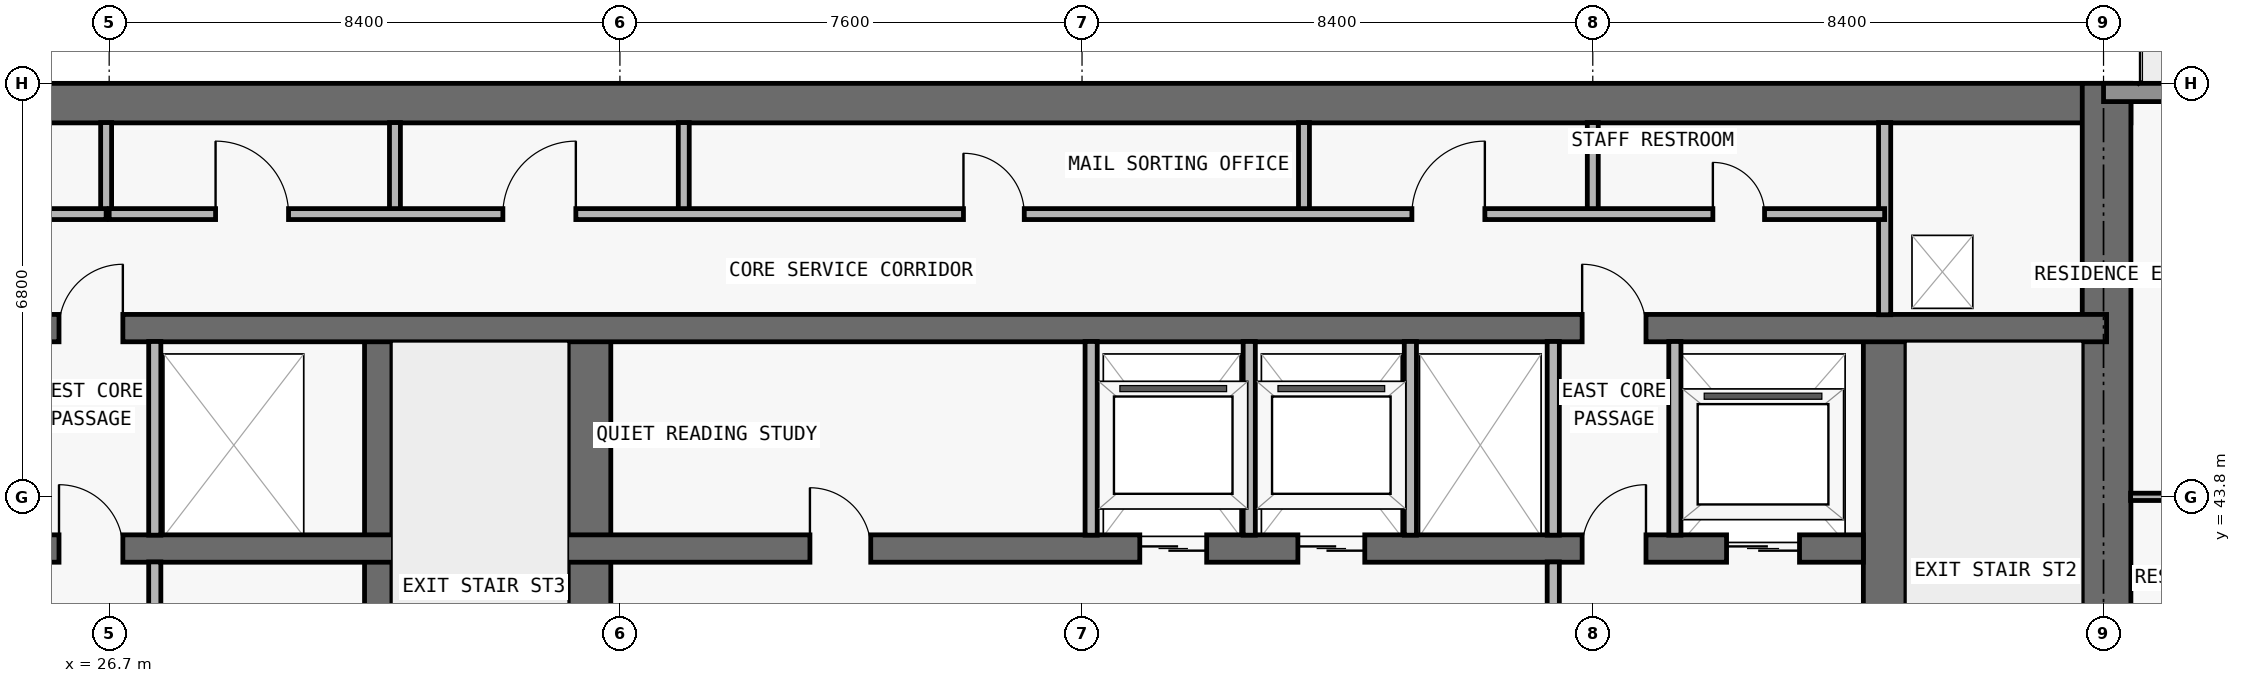
"""IFC4 building model, lengths in metres.
Left out: names, types, materials, properties, quantities, classifications, styles, units other than length and angle.
Written with IfcOpenShell. Run it as: python <this file> out.ifc"""

import sys

from ifc_helpers import new_model, si_unit, direction, frame, frame_2d, origin, place, context, subcontext, project, spatial, rectangle, extrude, element, fill, save


model = new_model("IFC4")
c1 = context("Model", 3, precision=1e-05, world=origin(), true_north=direction((0.0, 1.0)))
c2 = subcontext(c1, "Body", "Model", "MODEL_VIEW")
j1 = project(units=[si_unit("LENGTHUNIT", "METRE"), si_unit("PLANEANGLEUNIT", "RADIAN")], contexts=[c1])
p1 = place(None, origin())
s1 = spatial("IfcSite", under=j1, at=p1, CompositionType="ELEMENT")
p2 = place(p1, origin())
s2 = spatial("IfcBuilding", under=s1, at=p2, CompositionType="ELEMENT")
p3 = place(p2, frame((0.0, 0.0, 125.7)))
s3 = spatial("IfcBuildingStorey", under=s2, at=p3, CompositionType="ELEMENT", Elevation=125.7)
p4 = place(p3, frame((17.85, 50.275, 0.0), z_axis=(0.0, 0.0, 1.0), x_axis=(1.0, 0.0, 0.0)))
e1 = element("IfcWall", 1, at=p4, inside=s3, PredefinedType="SHEAR", context=c2, shape_type="SweptSolid", body=[
    extrude(rectangle(XDim=42.1, YDim=0.65, at=frame_2d((21.05, 0.0))), origin(), (0.0, 0.0, 1.0), 3.05),
])
p5 = place(p3, frame((59.55, 36.55, 0.0), z_axis=(0.0, 0.0, 1.0), x_axis=(0.0, 1.0, 0.0)))
e2 = element("IfcWall", 2, at=p5, inside=s3, PredefinedType="SHEAR", context=c2, shape_type="SweptSolid", body=[
    extrude(rectangle(XDim=14.05, YDim=0.8, at=frame_2d((7.025, 0.0))), origin(), (0.0, 0.0, 1.0), 3.05),
])
p6 = place(p3, frame((55.9, 36.95, 0.0), z_axis=(0.0, 0.0, 1.0), x_axis=(0.0, 1.0, 0.0)))
e3 = element("IfcWall", 3, at=p6, inside=s3, PredefinedType="SHEAR", context=c2, shape_type="SweptSolid", body=[
    extrude(rectangle(XDim=9.625, YDim=0.7, at=frame_2d((4.812, 0.0))), origin(), (0.0, 0.0, 1.0), 3.05),
])
p7 = place(p6, frame((0.6, 0.0, 0.0)))
e4 = element("IfcOpeningElement", 4, at=p7, cuts=e3, PredefinedType="OPENING", context=c2, shape_type="SweptSolid", body=[
    extrude(rectangle(XDim=1.1, YDim=2.15, at=frame_2d((0.55, 1.075))), frame((0.0, 0.36, 0.0), z_axis=(0.0, -1.0, 0.0), x_axis=(1.0, 0.0, 0.0)), (0.0, 0.0, 1.0), 0.72),
])
p8 = place(p3, frame((31.125, 36.95, 0.0), z_axis=(0.0, 0.0, 1.0), x_axis=(0.0, 1.0, 0.0)))
e5 = element("IfcWall", 5, at=p8, inside=s3, PredefinedType="SHEAR", context=c2, shape_type="SweptSolid", body=[
    extrude(rectangle(XDim=9.625, YDim=0.45, at=frame_2d((4.812, 0.0))), origin(), (0.0, 0.0, 1.0), 3.05),
])
p9 = place(p3, frame((34.6, 36.95, 0.0), z_axis=(0.0, 0.0, 1.0), x_axis=(0.0, 1.0, 0.0)))
e6 = element("IfcWall", 6, at=p9, inside=s3, PredefinedType="SHEAR", context=c2, shape_type="SweptSolid", body=[
    extrude(rectangle(XDim=9.625, YDim=0.7, at=frame_2d((4.812, 0.0))), origin(), (0.0, 0.0, 1.0), 3.05),
])
p10 = place(p3, frame((22.25, 42.95, 0.0), z_axis=(0.0, 0.0, 1.0), x_axis=(1.0, 0.0, 0.0)))
e7 = element("IfcWall", 7, at=p10, inside=s3, PredefinedType="SHEAR", context=c2, shape_type="SweptSolid", body=[
    extrude(rectangle(XDim=33.3, YDim=0.45, at=frame_2d((16.65, 0.0))), origin(), (0.0, 0.0, 1.0), 3.05),
])
p11 = place(p10, frame((1.05, 0.0, 0.0)))
e8 = element("IfcOpeningElement", 8, at=p11, cuts=e7, PredefinedType="OPENING", context=c2, shape_type="SweptSolid", body=[
    extrude(rectangle(XDim=1.2, YDim=2.2, at=frame_2d((0.6, 1.1))), frame((0.0, 0.235, 0.0), z_axis=(0.0, -1.0, 0.0), x_axis=(1.0, 0.0, 0.0)), (0.0, 0.0, 1.0), 0.47),
])
p12 = place(p10, frame((31.05, 0.0, 0.0)))
e9 = element("IfcOpeningElement", 9, at=p12, cuts=e7, PredefinedType="OPENING", context=c2, shape_type="SweptSolid", body=[
    extrude(rectangle(XDim=1.2, YDim=2.2, at=frame_2d((0.6, 1.1))), frame((0.0, 0.235, 0.0), z_axis=(0.0, -1.0, 0.0), x_axis=(1.0, 0.0, 0.0)), (0.0, 0.0, 1.0), 0.47),
])
p13 = place(p10, frame((21.4, 0.0, 0.0)))
e10 = element("IfcOpeningElement", 10, at=p13, cuts=e7, PredefinedType="OPENING", context=c2, shape_type="SweptSolid", body=[
    extrude(rectangle(XDim=1.1, YDim=2.2, at=frame_2d((0.55, 1.1))), frame((0.0, 0.235, 0.0), z_axis=(0.0, -1.0, 0.0), x_axis=(1.0, 0.0, 0.0)), (0.0, 0.0, 1.0), 0.47),
])
p14 = place(p10, frame((24.0, 0.0, 0.0)))
e11 = element("IfcOpeningElement", 11, at=p14, cuts=e7, PredefinedType="OPENING", context=c2, shape_type="SweptSolid", body=[
    extrude(rectangle(XDim=1.1, YDim=2.2, at=frame_2d((0.55, 1.1))), frame((0.0, 0.235, 0.0), z_axis=(0.0, -1.0, 0.0), x_axis=(1.0, 0.0, 0.0)), (0.0, 0.0, 1.0), 0.47),
])
p15 = place(p10, frame((3.625, 0.0, 0.0)))
e12 = element("IfcOpeningElement", 12, at=p15, cuts=e7, PredefinedType="OPENING", context=c2, shape_type="SweptSolid", body=[
    extrude(rectangle(XDim=1.05, YDim=2.15, at=frame_2d((0.525, 1.075))), frame((0.0, 0.235, 0.0), z_axis=(0.0, -1.0, 0.0), x_axis=(1.0, 0.0, 0.0)), (0.0, 0.0, 1.0), 0.47),
])
p16 = place(p10, frame((28.675, 0.0, 0.0)))
e13 = element("IfcOpeningElement", 13, at=p16, cuts=e7, PredefinedType="OPENING", context=c2, shape_type="SweptSolid", body=[
    extrude(rectangle(XDim=1.05, YDim=2.15, at=frame_2d((0.525, 1.075))), frame((0.0, 0.235, 0.0), z_axis=(0.0, -1.0, 0.0), x_axis=(1.0, 0.0, 0.0)), (0.0, 0.0, 1.0), 0.47),
])
p17 = place(p10, frame((15.975, 0.0, 0.0)))
e14 = element("IfcOpeningElement", 14, at=p17, cuts=e7, PredefinedType="OPENING", context=c2, shape_type="SweptSolid", body=[
    extrude(rectangle(XDim=1.0, YDim=2.2, at=frame_2d((0.5, 1.1))), frame((0.0, 0.235, 0.0), z_axis=(0.0, -1.0, 0.0), x_axis=(1.0, 0.0, 0.0)), (0.0, 0.0, 1.0), 0.47),
])
p18 = place(p3, frame((18.25, 46.575, 0.0), z_axis=(0.0, 0.0, 1.0), x_axis=(1.0, 0.0, 0.0)))
e15 = element("IfcWall", 15, at=p18, inside=s3, PredefinedType="SHEAR", context=c2, shape_type="SweptSolid", body=[
    extrude(rectangle(XDim=41.3, YDim=0.45, at=frame_2d((20.65, 0.0))), origin(), (0.0, 0.0, 1.0), 3.05),
])
p19 = place(p18, frame((7.625, 0.0, 0.0)))
e16 = element("IfcOpeningElement", 16, at=p19, cuts=e15, PredefinedType="OPENING", context=c2, shape_type="SweptSolid", body=[
    extrude(rectangle(XDim=1.05, YDim=2.15, at=frame_2d((0.525, 1.075))), frame((0.0, 0.235, 0.0), z_axis=(0.0, -1.0, 0.0), x_axis=(1.0, 0.0, 0.0)), (0.0, 0.0, 1.0), 0.47),
])
p20 = place(p18, frame((32.675, 0.0, 0.0)))
e17 = element("IfcOpeningElement", 17, at=p20, cuts=e15, PredefinedType="OPENING", context=c2, shape_type="SweptSolid", body=[
    extrude(rectangle(XDim=1.05, YDim=2.15, at=frame_2d((0.525, 1.075))), frame((0.0, 0.235, 0.0), z_axis=(0.0, -1.0, 0.0), x_axis=(1.0, 0.0, 0.0)), (0.0, 0.0, 1.0), 0.47),
])
p21 = place(p3, frame((59.5, 50.45, 0.0), z_axis=(0.0, 0.0, 1.0), x_axis=(1.0, 0.0, 0.0)))
e18 = element("IfcWall", 18, at=p21, inside=s3, PredefinedType="STANDARD", context=c2, shape_type="SweptSolid", body=[
    extrude(rectangle(XDim=10.6, YDim=0.3, at=frame_2d((5.3, 0.0))), origin(), (0.0, 0.0, 1.0), 3.05),
])
p22 = place(p21, frame((4.3, 0.0, 0.0)))
e19 = element("IfcOpeningElement", 19, at=p22, cuts=e18, PredefinedType="OPENING", context=c2, shape_type="SweptSolid", body=[
    extrude(rectangle(XDim=2.0, YDim=2.3, at=frame_2d((1.0, 1.15))), frame((0.0, 0.16, 0.0), z_axis=(0.0, -1.0, 0.0), x_axis=(1.0, 0.0, 0.0)), (0.0, 0.0, 1.0), 0.32),
])
p23 = place(p3, frame((26.65, 48.45, 0.0), z_axis=(0.0, 0.0, 1.0), x_axis=(0.0, 1.0, 0.0)))
e20 = element("IfcWall", 20, at=p23, inside=s3, PredefinedType="PARTITIONING", context=c2, shape_type="SweptSolid", body=[
    extrude(rectangle(XDim=1.505, YDim=0.18, at=frame_2d((0.752, 0.0))), origin(), (0.0, 0.0, 1.0), 3.05),
])
p24 = place(p3, frame((27.45, 37.345, 0.0), z_axis=(0.0, 0.0, 1.0), x_axis=(0.0, 1.0, 0.0)))
e21 = element("IfcWall", 21, at=p24, inside=s3, PredefinedType="PARTITIONING", context=c2, shape_type="SweptSolid", body=[
    extrude(rectangle(XDim=5.385, YDim=0.2, at=frame_2d((2.692, 0.0))), origin(), (0.0, 0.0, 1.0), 3.05),
])
p25 = place(p3, frame((27.45, 43.17, 0.0), z_axis=(0.0, 0.0, 1.0), x_axis=(0.0, 1.0, 0.0)))
e22 = element("IfcWall", 22, at=p25, inside=s3, PredefinedType="PARTITIONING", context=c2, shape_type="SweptSolid", body=[
    extrude(rectangle(XDim=3.185, YDim=0.2, at=frame_2d((1.593, 0.0))), origin(), (0.0, 0.0, 1.0), 3.05),
])
for number, where, z_axis, x_axis in (
    (23, (31.4, 48.45, 0.0), (0.0, 0.0, 1.0), (0.0, 1.0, 0.0)),
    (24, (36.15, 48.45, 0.0), (0.0, 0.0, 1.0), (0.0, 1.0, 0.0)),
):
    element("IfcWall", number, at=place(p3, frame(where, z_axis=z_axis, x_axis=x_axis)), inside=s3, PredefinedType="PARTITIONING", context=c2, shape_type="SweptSolid", body=[
        extrude(rectangle(XDim=1.505, YDim=0.18, at=frame_2d((0.752, 0.0))), origin(), (0.0, 0.0, 1.0), 3.05),
    ])
for number, where, z_axis, x_axis in (
    (25, (42.85, 43.17, 0.0), (0.0, 0.0, 1.0), (0.0, 1.0, 0.0)),
    (26, (45.45, 43.17, 0.0), (0.0, 0.0, 1.0), (0.0, 1.0, 0.0)),
):
    element("IfcWall", number, at=place(p3, frame(where, z_axis=z_axis, x_axis=x_axis)), inside=s3, PredefinedType="PARTITIONING", context=c2, shape_type="SweptSolid", body=[
        extrude(rectangle(XDim=3.185, YDim=0.2, at=frame_2d((1.593, 0.0))), origin(), (0.0, 0.0, 1.0), 3.05),
    ])
p26 = place(p3, frame((46.35, 48.45, 0.0), z_axis=(0.0, 0.0, 1.0), x_axis=(0.0, 1.0, 0.0)))
e27 = element("IfcWall", 27, at=p26, inside=s3, PredefinedType="PARTITIONING", context=c2, shape_type="SweptSolid", body=[
    extrude(rectangle(XDim=1.505, YDim=0.18, at=frame_2d((0.752, 0.0))), origin(), (0.0, 0.0, 1.0), 3.05),
])
p27 = place(p3, frame((48.1, 43.17, 0.0), z_axis=(0.0, 0.0, 1.0), x_axis=(0.0, 1.0, 0.0)))
e28 = element("IfcWall", 28, at=p27, inside=s3, PredefinedType="PARTITIONING", context=c2, shape_type="SweptSolid", body=[
    extrude(rectangle(XDim=3.185, YDim=0.2, at=frame_2d((1.593, 0.0))), origin(), (0.0, 0.0, 1.0), 3.05),
])
p28 = place(p3, frame((50.45, 37.345, 0.0), z_axis=(0.0, 0.0, 1.0), x_axis=(0.0, 1.0, 0.0)))
e29 = element("IfcWall", 29, at=p28, inside=s3, PredefinedType="PARTITIONING", context=c2, shape_type="SweptSolid", body=[
    extrude(rectangle(XDim=5.385, YDim=0.2, at=frame_2d((2.692, 0.0))), origin(), (0.0, 0.0, 1.0), 3.05),
])
p29 = place(p3, frame((50.45, 43.17, 0.0), z_axis=(0.0, 0.0, 1.0), x_axis=(0.0, 1.0, 0.0)))
e30 = element("IfcWall", 30, at=p29, inside=s3, PredefinedType="PARTITIONING", context=c2, shape_type="SweptSolid", body=[
    extrude(rectangle(XDim=3.185, YDim=0.2, at=frame_2d((1.593, 0.0))), origin(), (0.0, 0.0, 1.0), 3.05),
])
p30 = place(p3, frame((51.1, 48.45, 0.0), z_axis=(0.0, 0.0, 1.0), x_axis=(0.0, 1.0, 0.0)))
e31 = element("IfcWall", 31, at=p30, inside=s3, PredefinedType="PARTITIONING", context=c2, shape_type="SweptSolid", body=[
    extrude(rectangle(XDim=1.505, YDim=0.18, at=frame_2d((0.752, 0.0))), origin(), (0.0, 0.0, 1.0), 3.05),
])
p31 = place(p3, frame((52.45, 43.17, 0.0), z_axis=(0.0, 0.0, 1.0), x_axis=(0.0, 1.0, 0.0)))
e32 = element("IfcWall", 32, at=p31, inside=s3, PredefinedType="PARTITIONING", context=c2, shape_type="SweptSolid", body=[
    extrude(rectangle(XDim=3.185, YDim=0.2, at=frame_2d((1.593, 0.0))), origin(), (0.0, 0.0, 1.0), 3.05),
])
p32 = place(p3, frame((55.9, 46.795, 0.0), z_axis=(0.0, 0.0, 1.0), x_axis=(0.0, 1.0, 0.0)))
e33 = element("IfcWall", 33, at=p32, inside=s3, PredefinedType="PARTITIONING", context=c2, shape_type="SweptSolid", body=[
    extrude(rectangle(XDim=3.16, YDim=0.2, at=frame_2d((1.58, 0.0))), origin(), (0.0, 0.0, 1.0), 3.05),
])
p33 = place(p3, frame((59.945, 43.8, 0.0), z_axis=(0.0, 0.0, 1.0), x_axis=(1.0, 0.0, 0.0)))
e34 = element("IfcWall", 34, at=p33, inside=s3, PredefinedType="PARTITIONING", context=c2, shape_type="SweptSolid", body=[
    extrude(rectangle(XDim=13.66, YDim=0.12, at=frame_2d((6.83, 0.0))), origin(), (0.0, 0.0, 1.0), 2.339),
])
p34 = place(p33, frame((4.017, 0.0, 0.0)))
e35 = element("IfcOpeningElement", 35, at=p34, cuts=e34, PredefinedType="OPENING", context=c2, shape_type="SweptSolid", body=[
    extrude(rectangle(XDim=0.9, YDim=2.15, at=frame_2d((0.45, 1.075))), frame((0.0, 0.07, 0.0), z_axis=(0.0, -1.0, 0.0), x_axis=(1.0, 0.0, 0.0)), (0.0, 0.0, 1.0), 0.14),
])
p35 = place(p33, frame((0.702, 0.0, 0.0)))
e36 = element("IfcOpeningElement", 36, at=p35, cuts=e34, PredefinedType="OPENING", context=c2, shape_type="SweptSolid", body=[
    extrude(rectangle(XDim=0.85, YDim=2.1, at=frame_2d((0.425, 1.05))), frame((0.0, 0.07, 0.0), z_axis=(0.0, -1.0, 0.0), x_axis=(1.0, 0.0, 0.0)), (0.0, 0.0, 1.0), 0.14),
])
p36 = place(p3, frame((21.9, 48.45, 0.0), z_axis=(0.0, 0.0, 1.0), x_axis=(1.0, 0.0, 0.0)))
e37 = element("IfcWall", 37, at=p36, inside=s3, PredefinedType="PARTITIONING", context=c2, shape_type="SweptSolid", body=[
    extrude(rectangle(XDim=4.75, YDim=0.18, at=frame_2d((2.375, 0.0))), origin(), (0.0, 0.0, 1.0), 3.05),
])
p37 = place(p36, frame((1.775, 0.0, 0.0)))
e38 = element("IfcOpeningElement", 38, at=p37, cuts=e37, PredefinedType="OPENING", context=c2, shape_type="SweptSolid", body=[
    extrude(rectangle(XDim=1.2, YDim=2.2, at=frame_2d((0.6, 1.1))), frame((0.0, 0.1, 0.0), z_axis=(0.0, -1.0, 0.0), x_axis=(1.0, 0.0, 0.0)), (0.0, 0.0, 1.0), 0.2),
])
p38 = place(p3, frame((26.7, 48.45, 0.0), z_axis=(0.0, 0.0, 1.0), x_axis=(1.0, 0.0, 0.0)))
e39 = element("IfcWall", 39, at=p38, inside=s3, PredefinedType="PARTITIONING", context=c2, shape_type="SweptSolid", body=[
    extrude(rectangle(XDim=29.2, YDim=0.18, at=frame_2d((14.6, 0.0))), origin(), (0.0, 0.0, 1.0), 3.05),
])
p39 = place(p38, frame((1.75, 0.0, 0.0)))
e40 = element("IfcOpeningElement", 40, at=p39, cuts=e39, PredefinedType="OPENING", context=c2, shape_type="SweptSolid", body=[
    extrude(rectangle(XDim=1.2, YDim=2.2, at=frame_2d((0.6, 1.1))), frame((0.0, 0.1, 0.0), z_axis=(0.0, -1.0, 0.0), x_axis=(1.0, 0.0, 0.0)), (0.0, 0.0, 1.0), 0.2),
])
p40 = place(p38, frame((6.475, 0.0, 0.0)))
e41 = element("IfcOpeningElement", 41, at=p40, cuts=e39, PredefinedType="OPENING", context=c2, shape_type="SweptSolid", body=[
    extrude(rectangle(XDim=1.2, YDim=2.2, at=frame_2d((0.6, 1.1))), frame((0.0, 0.1, 0.0), z_axis=(0.0, -1.0, 0.0), x_axis=(1.0, 0.0, 0.0)), (0.0, 0.0, 1.0), 0.2),
])
p41 = place(p38, frame((14.05, 0.0, 0.0)))
e42 = element("IfcOpeningElement", 42, at=p41, cuts=e39, PredefinedType="OPENING", context=c2, shape_type="SweptSolid", body=[
    extrude(rectangle(XDim=1.0, YDim=2.2, at=frame_2d((0.5, 1.1))), frame((0.0, 0.1, 0.0), z_axis=(0.0, -1.0, 0.0), x_axis=(1.0, 0.0, 0.0)), (0.0, 0.0, 1.0), 0.2),
])
p42 = place(p38, frame((21.425, 0.0, 0.0)))
e43 = element("IfcOpeningElement", 43, at=p42, cuts=e39, PredefinedType="OPENING", context=c2, shape_type="SweptSolid", body=[
    extrude(rectangle(XDim=1.2, YDim=2.2, at=frame_2d((0.6, 1.1))), frame((0.0, 0.1, 0.0), z_axis=(0.0, -1.0, 0.0), x_axis=(1.0, 0.0, 0.0)), (0.0, 0.0, 1.0), 0.2),
])
p43 = place(p38, frame((26.375, 0.0, 0.0)))
e44 = element("IfcOpeningElement", 44, at=p43, cuts=e39, PredefinedType="OPENING", context=c2, shape_type="SweptSolid", body=[
    extrude(rectangle(XDim=0.85, YDim=2.1, at=frame_2d((0.425, 1.05))), frame((0.0, 0.1, 0.0), z_axis=(0.0, -1.0, 0.0), x_axis=(1.0, 0.0, 0.0)), (0.0, 0.0, 1.0), 0.2),
])
p44 = place(p12, origin())
e45 = element("IfcDoor", 45, at=p44, inside=s3, OperationType="DOUBLE_DOOR_SLIDING", PredefinedType="DOOR", context=c2, shape_type="SweptSolid", body=[
    extrude(rectangle(XDim=1.2, YDim=2.2, at=frame_2d((0.6, 1.1))), frame((0.0, 0.025, 0.0), z_axis=(0.0, -1.0, 0.0), x_axis=(1.0, 0.0, 0.0)), (0.0, 0.0, 1.0), 0.05),
])
fill(e9, e45)
p45 = place(p13, origin())
e46 = element("IfcDoor", 46, at=p45, inside=s3, OperationType="DOUBLE_DOOR_SLIDING", PredefinedType="DOOR", context=c2, shape_type="SweptSolid", body=[
    extrude(rectangle(XDim=1.1, YDim=2.2, at=frame_2d((0.55, 1.1))), frame((0.0, 0.025, 0.0), z_axis=(0.0, -1.0, 0.0), x_axis=(1.0, 0.0, 0.0)), (0.0, 0.0, 1.0), 0.05),
])
fill(e10, e46)
p46 = place(p14, origin())
e47 = element("IfcDoor", 47, at=p46, inside=s3, OperationType="DOUBLE_DOOR_SLIDING", PredefinedType="DOOR", context=c2, shape_type="SweptSolid", body=[
    extrude(rectangle(XDim=1.1, YDim=2.2, at=frame_2d((0.55, 1.1))), frame((0.0, 0.025, 0.0), z_axis=(0.0, -1.0, 0.0), x_axis=(1.0, 0.0, 0.0)), (0.0, 0.0, 1.0), 0.05),
])
fill(e11, e47)
p47 = place(p15, origin())
e48 = element("IfcDoor", 48, at=p47, inside=s3, OperationType="SINGLE_SWING_LEFT", PredefinedType="DOOR", context=c2, shape_type="SweptSolid", body=[
    extrude(rectangle(XDim=1.05, YDim=2.15, at=frame_2d((0.525, 1.075))), frame((0.0, 0.025, 0.0), z_axis=(0.0, -1.0, 0.0), x_axis=(1.0, 0.0, 0.0)), (0.0, 0.0, 1.0), 0.05),
])
fill(e12, e48)
p48 = place(p16, origin())
e49 = element("IfcDoor", 49, at=p48, inside=s3, OperationType="SINGLE_SWING_RIGHT", PredefinedType="DOOR", context=c2, shape_type="SweptSolid", body=[
    extrude(rectangle(XDim=1.05, YDim=2.15, at=frame_2d((0.525, 1.075))), frame((0.0, 0.025, 0.0), z_axis=(0.0, -1.0, 0.0), x_axis=(1.0, 0.0, 0.0)), (0.0, 0.0, 1.0), 0.05),
])
fill(e13, e49)
p49 = place(p17, origin())
e50 = element("IfcDoor", 50, at=p49, inside=s3, OperationType="SINGLE_SWING_LEFT", PredefinedType="DOOR", context=c2, shape_type="SweptSolid", body=[
    extrude(rectangle(XDim=1.0, YDim=2.2, at=frame_2d((0.5, 1.1))), frame((0.0, 0.025, 0.0), z_axis=(0.0, -1.0, 0.0), x_axis=(1.0, 0.0, 0.0)), (0.0, 0.0, 1.0), 0.05),
])
fill(e14, e50)
p50 = place(p19, origin())
e51 = element("IfcDoor", 51, at=p50, inside=s3, OperationType="SINGLE_SWING_RIGHT", PredefinedType="DOOR", context=c2, shape_type="SweptSolid", body=[
    extrude(rectangle(XDim=1.05, YDim=2.15, at=frame_2d((0.525, 1.075))), frame((0.0, 0.025, 0.0), z_axis=(0.0, -1.0, 0.0), x_axis=(1.0, 0.0, 0.0)), (0.0, 0.0, 1.0), 0.05),
])
fill(e16, e51)
p51 = place(p20, origin())
e52 = element("IfcDoor", 52, at=p51, inside=s3, OperationType="SINGLE_SWING_LEFT", PredefinedType="DOOR", context=c2, shape_type="SweptSolid", body=[
    extrude(rectangle(XDim=1.05, YDim=2.15, at=frame_2d((0.525, 1.075))), frame((0.0, 0.025, 0.0), z_axis=(0.0, -1.0, 0.0), x_axis=(1.0, 0.0, 0.0)), (0.0, 0.0, 1.0), 0.05),
])
fill(e17, e52)
p52 = place(p39, origin())
e53 = element("IfcDoor", 53, at=p52, inside=s3, OperationType="SINGLE_SWING_LEFT", PredefinedType="DOOR", context=c2, shape_type="SweptSolid", body=[
    extrude(rectangle(XDim=1.2, YDim=2.2, at=frame_2d((0.6, 1.1))), frame((0.0, 0.025, 0.0), z_axis=(0.0, -1.0, 0.0), x_axis=(1.0, 0.0, 0.0)), (0.0, 0.0, 1.0), 0.05),
])
fill(e40, e53)
p53 = place(p40, origin())
e54 = element("IfcDoor", 54, at=p53, inside=s3, OperationType="SINGLE_SWING_RIGHT", PredefinedType="DOOR", context=c2, shape_type="SweptSolid", body=[
    extrude(rectangle(XDim=1.2, YDim=2.2, at=frame_2d((0.6, 1.1))), frame((0.0, 0.025, 0.0), z_axis=(0.0, -1.0, 0.0), x_axis=(1.0, 0.0, 0.0)), (0.0, 0.0, 1.0), 0.05),
])
fill(e41, e54)
p54 = place(p41, origin())
e55 = element("IfcDoor", 55, at=p54, inside=s3, OperationType="SINGLE_SWING_LEFT", PredefinedType="DOOR", context=c2, shape_type="SweptSolid", body=[
    extrude(rectangle(XDim=1.0, YDim=2.2, at=frame_2d((0.5, 1.1))), frame((0.0, 0.025, 0.0), z_axis=(0.0, -1.0, 0.0), x_axis=(1.0, 0.0, 0.0)), (0.0, 0.0, 1.0), 0.05),
])
fill(e42, e55)
p55 = place(p42, origin())
e56 = element("IfcDoor", 56, at=p55, inside=s3, OperationType="SINGLE_SWING_RIGHT", PredefinedType="DOOR", context=c2, shape_type="SweptSolid", body=[
    extrude(rectangle(XDim=1.2, YDim=2.2, at=frame_2d((0.6, 1.1))), frame((0.0, 0.025, 0.0), z_axis=(0.0, -1.0, 0.0), x_axis=(1.0, 0.0, 0.0)), (0.0, 0.0, 1.0), 0.05),
])
fill(e43, e56)
p56 = place(p43, origin())
e57 = element("IfcDoor", 57, at=p56, inside=s3, OperationType="SINGLE_SWING_LEFT", PredefinedType="DOOR", context=c2, shape_type="SweptSolid", body=[
    extrude(rectangle(XDim=0.85, YDim=2.1, at=frame_2d((0.425, 1.05))), frame((0.0, 0.025, 0.0), z_axis=(0.0, -1.0, 0.0), x_axis=(1.0, 0.0, 0.0)), (0.0, 0.0, 1.0), 0.05),
])
fill(e44, e57)
save(model, sys.argv[1])
